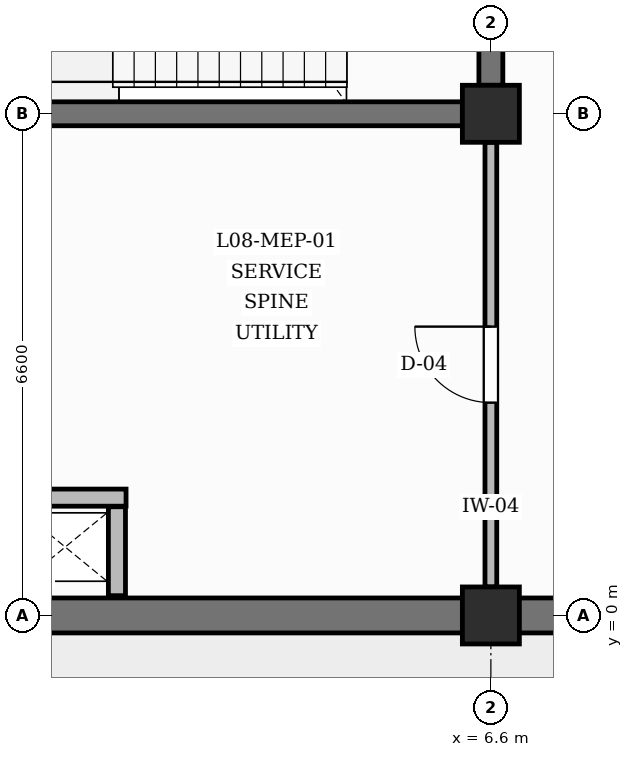
"""IFC4 building model, lengths in metres.
Left out: names, types, materials, properties, quantities, classifications, styles, units other than length and angle.
Written with IfcOpenShell. Run it as: python <this file> out.ifc"""

import sys

from ifc_helpers import new_model, si_unit, direction, frame, frame_2d, origin, origin_2d, place, context, subcontext, project, spatial, rectangle, extrude, element, fill, save


model = new_model("IFC4")
c1 = context("Model", 3, precision=1e-05, world=origin(), true_north=direction((0.0, 1.0)))
c2 = subcontext(c1, "Body", "Model", "MODEL_VIEW")
j1 = project(units=[si_unit("LENGTHUNIT", "METRE"), si_unit("PLANEANGLEUNIT", "RADIAN")], contexts=[c1])
p1 = place(None, origin())
s1 = spatial("IfcSite", under=j1, at=p1, CompositionType="ELEMENT")
p2 = place(p1, origin())
s2 = spatial("IfcBuilding", under=s1, at=p2, CompositionType="ELEMENT")
p3 = place(p2, frame((0.0, 0.0, 35.4)))
s3 = spatial("IfcBuildingStorey", under=s2, at=p3, CompositionType="ELEMENT", Elevation=35.4)
for number, where, z_axis, x_axis in (
    (1, (6.6, 0.0, 0.0), (0.0, 0.0, 1.0), (1.0, 0.0, 0.0)),
    (2, (6.6, 6.6, 0.0), (0.0, 0.0, 1.0), (1.0, 0.0, 0.0)),
):
    element("IfcColumn", number, at=place(p3, frame(where, z_axis=z_axis, x_axis=x_axis)), inside=s3, PredefinedType="COLUMN", context=c2, shape_type="SweptSolid", body=[
        extrude(rectangle(XDim=0.75, YDim=0.75, at=origin_2d()), origin(), (0.0, 0.0, 1.0), 4.2),
    ])
p4 = place(p3, frame((0.375, 0.0, 0.0), z_axis=(0.0, 0.0, 1.0), x_axis=(1.0, 0.0, 0.0)))
e3 = element("IfcWall", 3, at=p4, inside=s3, PredefinedType="SOLIDWALL", context=c2, shape_type="SweptSolid", body=[
    extrude(rectangle(XDim=5.85, YDim=0.46, at=frame_2d((2.925, 0.0))), origin(), (0.0, 0.0, 1.0), 3.28),
])
p5 = place(p3, frame((6.975, 0.0, 0.0), z_axis=(0.0, 0.0, 1.0), x_axis=(1.0, 0.0, 0.0)))
e4 = element("IfcWall", 4, at=p5, inside=s3, PredefinedType="SOLIDWALL", context=c2, shape_type="SweptSolid", body=[
    extrude(rectangle(XDim=5.85, YDim=0.46, at=frame_2d((2.925, 0.0))), origin(), (0.0, 0.0, 1.0), 3.28),
])
p6 = place(p3, frame((0.375, 6.6, 0.0), z_axis=(0.0, 0.0, 1.0), x_axis=(1.0, 0.0, 0.0)))
e5 = element("IfcWall", 5, at=p6, inside=s3, PredefinedType="SHEAR", context=c2, shape_type="SweptSolid", body=[
    extrude(rectangle(XDim=5.85, YDim=0.315, at=frame_2d((2.925, 0.0))), origin(), (0.0, 0.0, 1.0), 3.18),
])
p7 = place(p3, frame((6.6, 6.975, 0.0), z_axis=(0.0, 0.0, 1.0), x_axis=(0.0, 1.0, 0.0)))
e6 = element("IfcWall", 6, at=p7, inside=s3, PredefinedType="SHEAR", context=c2, shape_type="SweptSolid", body=[
    extrude(rectangle(XDim=5.85, YDim=0.315, at=frame_2d((2.925, 0.0))), origin(), (0.0, 0.0, 1.0), 3.18),
])
p8 = place(p7, frame((2.35, 0.0, 0.0)))
e7 = element("IfcOpeningElement", 7, at=p8, cuts=e6, PredefinedType="OPENING", context=c2, shape_type="SweptSolid", body=[
    extrude(rectangle(XDim=1.15, YDim=2.2, at=frame_2d((0.575, 1.1))), frame((0.0, 0.167, 0.0), z_axis=(0.0, -1.0, 0.0), x_axis=(1.0, 0.0, 0.0)), (0.0, 0.0, 1.0), 0.335),
])
p9 = place(p3, frame((1.68, 0.26, 0.0), z_axis=(0.0, 0.0, 1.0), x_axis=(0.0, 1.0, 0.0)))
e8 = element("IfcWall", 8, at=p9, inside=s3, PredefinedType="PARTITIONING", context=c2, shape_type="SweptSolid", body=[
    extrude(rectangle(XDim=1.17, YDim=0.225, at=frame_2d((0.585, 0.0))), origin(), (0.0, 0.0, 1.0), 3.88),
])
p10 = place(p3, frame((0.26, 1.55, 0.0), z_axis=(0.0, 0.0, 1.0), x_axis=(1.0, 0.0, 0.0)))
e9 = element("IfcWall", 9, at=p10, inside=s3, PredefinedType="PARTITIONING", context=c2, shape_type="SweptSolid", body=[
    extrude(rectangle(XDim=1.54, YDim=0.225, at=frame_2d((0.77, 0.0))), origin(), (0.0, 0.0, 1.0), 3.88),
])
p11 = place(p3, frame((6.6, 0.375, 0.0), z_axis=(0.0, 0.0, 1.0), x_axis=(0.0, 1.0, 0.0)))
e10 = element("IfcWall", 10, at=p11, inside=s3, PredefinedType="PARTITIONING", context=c2, shape_type="SweptSolid", body=[
    extrude(rectangle(XDim=5.85, YDim=0.155, at=frame_2d((2.925, 0.0))), origin(), (0.0, 0.0, 1.0), 3.18),
])
p12 = place(p11, frame((2.425, 0.0, 0.0)))
e11 = element("IfcOpeningElement", 11, at=p12, cuts=e10, PredefinedType="OPENING", context=c2, shape_type="SweptSolid", body=[
    extrude(rectangle(XDim=1.0, YDim=2.1, at=frame_2d((0.5, 1.05))), frame((0.0, 0.087, 0.0), z_axis=(0.0, -1.0, 0.0), x_axis=(1.0, 0.0, 0.0)), (0.0, 0.0, 1.0), 0.175),
])
p13 = place(p12, origin())
e12 = element("IfcDoor", 12, at=p13, inside=s3, OperationType="SINGLE_SWING_RIGHT", PredefinedType="DOOR", context=c2, shape_type="SweptSolid", body=[
    extrude(rectangle(XDim=1.0, YDim=2.1, at=frame_2d((0.5, 1.05))), frame((0.0, 0.025, 0.0), z_axis=(0.0, -1.0, 0.0), x_axis=(1.0, 0.0, 0.0)), (0.0, 0.0, 1.0), 0.05),
])
fill(e11, e12)
save(model, sys.argv[1])
